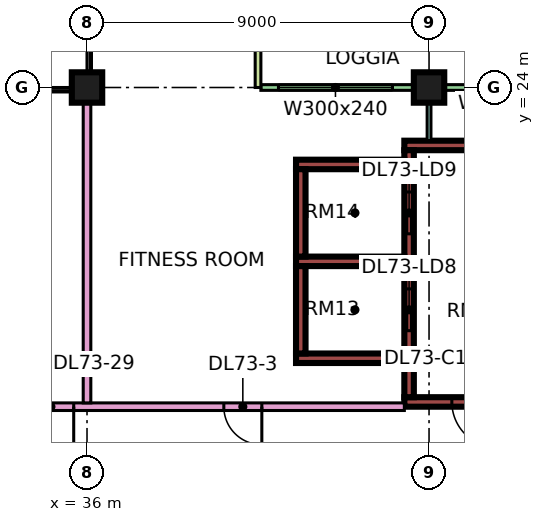
"""IFC4 building model, lengths in metres.
Left out: names, types, materials, properties, quantities, classifications, styles, units other than length and angle.
Written with IfcOpenShell. Run it as: python <this file> out.ifc"""

import sys

from ifc_helpers import new_model, si_unit, direction, frame, frame_2d, origin, origin_2d, place, context, subcontext, project, spatial, rectangle, extrude, element, fill, save


model = new_model("IFC4")
c1 = context("Model", 3, precision=1e-05, world=origin(), true_north=direction((0.0, 1.0)))
c2 = subcontext(c1, "Body", "Model", "MODEL_VIEW")
j1 = project(units=[si_unit("LENGTHUNIT", "METRE"), si_unit("PLANEANGLEUNIT", "RADIAN")], contexts=[c1])
p1 = place(None, origin())
s1 = spatial("IfcSite", under=j1, at=p1, CompositionType="ELEMENT")
p2 = place(p1, origin())
s2 = spatial("IfcBuilding", under=s1, at=p2, CompositionType="ELEMENT")
p3 = place(p2, frame((0.0, 0.0, 310.9)))
s3 = spatial("IfcBuildingStorey", under=s2, at=p3, CompositionType="ELEMENT", Elevation=310.9)
for number, where, z_axis, x_axis in (
    (1, (36.0, 24.0, 0.0), (0.0, 0.0, 1.0), (1.0, 0.0, 0.0)),
    (2, (45.0, 24.0, 0.0), (0.0, 0.0, 1.0), (1.0, 0.0, 0.0)),
):
    element("IfcColumn", number, at=place(p3, frame(where, z_axis=z_axis, x_axis=x_axis)), inside=s3, PredefinedType="COLUMN", context=c2, shape_type="SweptSolid", body=[
        extrude(rectangle(XDim=0.8, YDim=0.8, at=origin_2d()), origin(), (0.0, 0.0, 1.0), 3.75),
    ])
p4 = place(p3, frame((44.35, 15.725, 0.0), z_axis=(0.0, 0.0, 1.0), x_axis=(1.0, 0.0, 0.0)))
e3 = element("IfcWall", 3, at=p4, inside=s3, PredefinedType="SHEAR", context=c2, shape_type="SweptSolid", body=[
    extrude(rectangle(XDim=3.425, YDim=0.25, at=frame_2d((1.712, 0.0))), origin(), (0.0, 0.0, 1.0), 3.75),
])
p5 = place(p4, frame((1.25, 0.0, 0.0)))
e4 = element("IfcOpeningElement", 4, at=p5, cuts=e3, PredefinedType="OPENING", context=c2, shape_type="SweptSolid", body=[
    extrude(rectangle(XDim=1.2, YDim=2.2, at=frame_2d((0.6, 1.1))), frame((0.0, 0.135, 0.0), z_axis=(0.0, -1.0, 0.0), x_axis=(1.0, 0.0, 0.0)), (0.0, 0.0, 1.0), 0.27),
])
p6 = place(p3, frame((44.35, 22.475, 0.0), z_axis=(0.0, 0.0, 1.0), x_axis=(1.0, 0.0, 0.0)))
e5 = element("IfcWall", 5, at=p6, inside=s3, PredefinedType="SHEAR", context=c2, shape_type="SweptSolid", body=[
    extrude(rectangle(XDim=3.425, YDim=0.25, at=frame_2d((1.712, 0.0))), origin(), (0.0, 0.0, 1.0), 3.75),
])
p7 = place(p3, frame((44.475, 15.85, 0.0), z_axis=(0.0, 0.0, 1.0), x_axis=(0.0, 1.0, 0.0)))
e6 = element("IfcWall", 6, at=p7, inside=s3, PredefinedType="SHEAR", context=c2, shape_type="SweptSolid", body=[
    extrude(rectangle(XDim=6.5, YDim=0.25, at=frame_2d((3.25, 0.0))), origin(), (0.0, 0.0, 1.0), 3.75),
])
p8 = place(p7, frame((1.75, 0.0, 0.0)))
e7 = element("IfcOpeningElement", 7, at=p8, cuts=e6, PredefinedType="OPENING", context=c2, shape_type="SweptSolid", body=[
    extrude(rectangle(XDim=1.1, YDim=2.2, at=frame_2d((0.55, 1.1))), frame((0.0, 0.135, 0.0), z_axis=(0.0, -1.0, 0.0), x_axis=(1.0, 0.0, 0.0)), (0.0, 0.0, 1.0), 0.27),
])
p9 = place(p7, frame((4.3, 0.0, 0.0)))
e8 = element("IfcOpeningElement", 8, at=p9, cuts=e6, PredefinedType="OPENING", context=c2, shape_type="SweptSolid", body=[
    extrude(rectangle(XDim=1.1, YDim=2.2, at=frame_2d((0.55, 1.1))), frame((0.0, 0.135, 0.0), z_axis=(0.0, -1.0, 0.0), x_axis=(1.0, 0.0, 0.0)), (0.0, 0.0, 1.0), 0.27),
])
for number, where, z_axis, x_axis in (
    (9, (41.5, 16.875, 0.0), (0.0, 0.0, 1.0), (1.0, 0.0, 0.0)),
    (10, (41.5, 19.425, 0.0), (0.0, 0.0, 1.0), (1.0, 0.0, 0.0)),
    (11, (41.5, 21.975, 0.0), (0.0, 0.0, 1.0), (1.0, 0.0, 0.0)),
):
    element("IfcWall", number, at=place(p3, frame(where, z_axis=z_axis, x_axis=x_axis)), inside=s3, PredefinedType="SHEAR", context=c2, shape_type="SweptSolid", body=[
        extrude(rectangle(XDim=2.85, YDim=0.25, at=frame_2d((1.425, 0.0))), origin(), (0.0, 0.0, 1.0), 3.75),
    ])
for number, where, z_axis, x_axis in (
    (12, (41.625, 17.0, 0.0), (0.0, 0.0, 1.0), (0.0, 1.0, 0.0)),
    (13, (41.625, 19.55, 0.0), (0.0, 0.0, 1.0), (0.0, 1.0, 0.0)),
):
    element("IfcWall", number, at=place(p3, frame(where, z_axis=z_axis, x_axis=x_axis)), inside=s3, PredefinedType="SHEAR", context=c2, shape_type="SweptSolid", body=[
        extrude(rectangle(XDim=2.3, YDim=0.25, at=frame_2d((1.15, 0.0))), origin(), (0.0, 0.0, 1.0), 3.75),
    ])
p10 = place(p3, frame((47.925, 24.0, 0.0), z_axis=(0.0, 0.0, 1.0), x_axis=(-1.0, 0.0, 0.0)))
e14 = element("IfcWall", 14, at=p10, inside=s3, PredefinedType="SOLIDWALL", context=c2, shape_type="SweptSolid", body=[
    extrude(rectangle(XDim=7.35, YDim=0.15, at=frame_2d((3.675, 0.0))), origin(), (0.0, 0.0, 1.0), 3.35),
])
p11 = place(p10, frame((0.613, 0.0, 0.45)))
e15 = element("IfcOpeningElement", 15, at=p11, cuts=e14, PredefinedType="OPENING", context=c2, shape_type="SweptSolid", body=[
    extrude(rectangle(XDim=1.2, YDim=2.4, at=frame_2d((0.6, 1.2))), frame((0.0, 0.085, 0.0), z_axis=(0.0, -1.0, 0.0), x_axis=(1.0, 0.0, 0.0)), (0.0, 0.0, 1.0), 0.17),
])
p12 = place(p10, frame((3.887, 0.0, 0.45)))
e16 = element("IfcOpeningElement", 16, at=p12, cuts=e14, PredefinedType="OPENING", context=c2, shape_type="SweptSolid", body=[
    extrude(rectangle(XDim=3.0, YDim=2.4, at=frame_2d((1.5, 1.2))), frame((0.0, 0.085, 0.0), z_axis=(0.0, -1.0, 0.0), x_axis=(1.0, 0.0, 0.0)), (0.0, 0.0, 1.0), 0.17),
])
p13 = place(p3, frame((40.5, 25.5, 0.0), z_axis=(0.0, 0.0, 1.0), x_axis=(0.0, -1.0, 0.0)))
e17 = element("IfcWall", 17, at=p13, inside=s3, PredefinedType="SOLIDWALL", context=c2, shape_type="SweptSolid", body=[
    extrude(rectangle(XDim=1.5, YDim=0.15, at=frame_2d((0.75, 0.0))), origin(), (0.0, 0.0, 1.0), 3.35),
])
p14 = place(p3, frame((34.0, 15.6, 0.0), z_axis=(0.0, 0.0, 1.0), x_axis=(1.0, 0.0, 0.0)))
e18 = element("IfcWall", 18, at=p14, inside=s3, PredefinedType="PARTITIONING", context=c2, shape_type="SweptSolid", body=[
    extrude(rectangle(XDim=10.35, YDim=0.2, at=frame_2d((5.175, 0.0))), origin(), (0.0, 0.0, 1.0), 3.35),
])
p15 = place(p14, frame((5.6, 0.0, 0.0)))
e19 = element("IfcOpeningElement", 19, at=p15, cuts=e18, PredefinedType="OPENING", context=c2, shape_type="SweptSolid", body=[
    extrude(rectangle(XDim=1.0, YDim=2.1, at=frame_2d((0.5, 1.05))), frame((0.0, 0.11, 0.0), z_axis=(0.0, -1.0, 0.0), x_axis=(1.0, 0.0, 0.0)), (0.0, 0.0, 1.0), 0.22),
])
p16 = place(p14, frame((0.45, 0.0, 0.0)))
e20 = element("IfcOpeningElement", 20, at=p16, cuts=e18, PredefinedType="OPENING", context=c2, shape_type="SweptSolid", body=[
    extrude(rectangle(XDim=1.2, YDim=2.1, at=frame_2d((0.6, 1.05))), frame((0.0, 0.11, 0.0), z_axis=(0.0, -1.0, 0.0), x_axis=(1.0, 0.0, 0.0)), (0.0, 0.0, 1.0), 0.22),
])
p17 = place(p3, frame((36.0, 15.7, 0.0), z_axis=(0.0, 0.0, 1.0), x_axis=(0.0, 1.0, 0.0)))
e21 = element("IfcWall", 21, at=p17, inside=s3, PredefinedType="PARTITIONING", context=c2, shape_type="SweptSolid", body=[
    extrude(rectangle(XDim=8.3, YDim=0.2, at=frame_2d((4.15, 0.0))), origin(), (0.0, 0.0, 1.0), 3.35),
])
p18 = place(p3, frame((45.0, 22.6, 0.0), z_axis=(0.0, 0.0, 1.0), x_axis=(0.0, 1.0, 0.0)))
e22 = element("IfcWall", 22, at=p18, inside=s3, PredefinedType="PARTITIONING", context=c2, shape_type="SweptSolid", body=[
    extrude(rectangle(XDim=1.326, YDim=0.1, at=frame_2d((0.663, 0.0))), origin(), (0.0, 0.0, 1.0), 3.35),
])
p19 = place(p12, origin())
e23 = element("IfcWindow", 23, at=p19, inside=s3, PartitioningType="SINGLE_PANEL", PredefinedType="WINDOW", context=c2, shape_type="SweptSolid", body=[
    extrude(rectangle(XDim=3.0, YDim=2.4, at=frame_2d((1.5, 1.2))), frame((0.0, 0.03, 0.0), z_axis=(0.0, -1.0, 0.0), x_axis=(1.0, 0.0, 0.0)), (0.0, 0.0, 1.0), 0.06),
])
fill(e16, e23)
p20 = place(p5, origin())
e24 = element("IfcDoor", 24, at=p20, inside=s3, OperationType="SINGLE_SWING_RIGHT", PredefinedType="DOOR", context=c2, shape_type="SweptSolid", body=[
    extrude(rectangle(XDim=1.2, YDim=2.2, at=frame_2d((0.6, 1.1))), frame((0.0, 0.025, 0.0), z_axis=(0.0, -1.0, 0.0), x_axis=(1.0, 0.0, 0.0)), (0.0, 0.0, 1.0), 0.05),
])
fill(e4, e24)
p21 = place(p8, origin())
e25 = element("IfcDoor", 25, at=p21, inside=s3, OperationType="DOUBLE_DOOR_SLIDING", PredefinedType="DOOR", context=c2, shape_type="SweptSolid", body=[
    extrude(rectangle(XDim=1.1, YDim=2.2, at=frame_2d((0.55, 1.1))), frame((0.0, 0.025, 0.0), z_axis=(0.0, -1.0, 0.0), x_axis=(1.0, 0.0, 0.0)), (0.0, 0.0, 1.0), 0.05),
])
fill(e7, e25)
p22 = place(p9, origin())
e26 = element("IfcDoor", 26, at=p22, inside=s3, OperationType="DOUBLE_DOOR_SLIDING", PredefinedType="DOOR", context=c2, shape_type="SweptSolid", body=[
    extrude(rectangle(XDim=1.1, YDim=2.2, at=frame_2d((0.55, 1.1))), frame((0.0, 0.025, 0.0), z_axis=(0.0, -1.0, 0.0), x_axis=(1.0, 0.0, 0.0)), (0.0, 0.0, 1.0), 0.05),
])
fill(e8, e26)
p23 = place(p15, origin())
e27 = element("IfcDoor", 27, at=p23, inside=s3, OperationType="SINGLE_SWING_RIGHT", PredefinedType="DOOR", context=c2, shape_type="SweptSolid", body=[
    extrude(rectangle(XDim=1.0, YDim=2.1, at=frame_2d((0.5, 1.05))), frame((0.0, 0.025, 0.0), z_axis=(0.0, -1.0, 0.0), x_axis=(1.0, 0.0, 0.0)), (0.0, 0.0, 1.0), 0.05),
])
fill(e19, e27)
p24 = place(p16, origin())
e28 = element("IfcDoor", 28, at=p24, inside=s3, OperationType="SINGLE_SWING_RIGHT", PredefinedType="DOOR", context=c2, shape_type="SweptSolid", body=[
    extrude(rectangle(XDim=1.2, YDim=2.1, at=frame_2d((0.6, 1.05))), frame((0.0, 0.025, 0.0), z_axis=(0.0, -1.0, 0.0), x_axis=(1.0, 0.0, 0.0)), (0.0, 0.0, 1.0), 0.05),
])
fill(e20, e28)
save(model, sys.argv[1])
